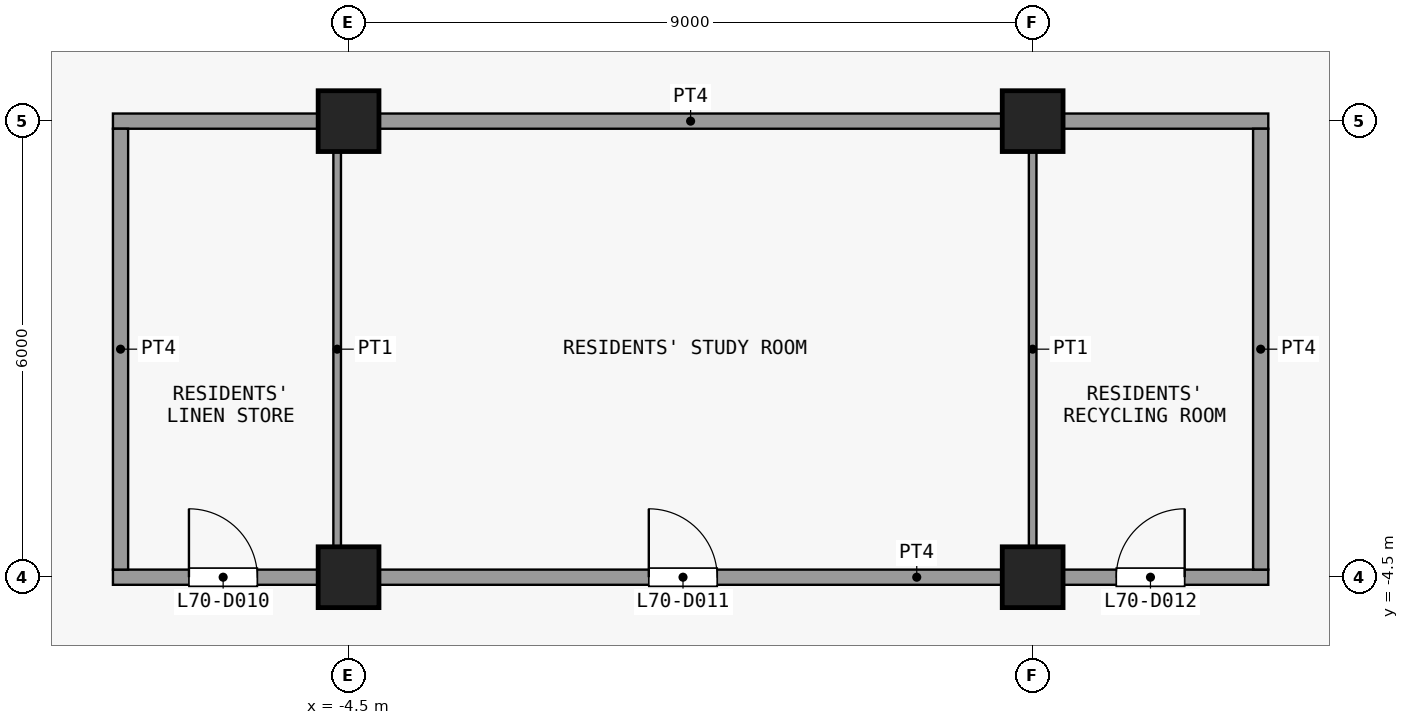
"""IFC4 building model, lengths in metres.
Left out: names, types, materials, properties, quantities, classifications, styles, units other than length and angle.
Written with IfcOpenShell. Run it as: python <this file> out.ifc"""

import sys

from ifc_helpers import new_model, si_unit, direction, frame, frame_2d, origin, origin_2d, place, context, subcontext, project, spatial, rectangle, extrude, element, fill, save


model = new_model("IFC4")
c1 = context("Model", 3, precision=1e-05, world=origin(), true_north=direction((0.0, 1.0)))
c2 = subcontext(c1, "Body", "Model", "MODEL_VIEW")
j1 = project(units=[si_unit("LENGTHUNIT", "METRE"), si_unit("PLANEANGLEUNIT", "RADIAN")], contexts=[c1])
p1 = place(None, origin())
s1 = spatial("IfcSite", under=j1, at=p1, CompositionType="ELEMENT")
p2 = place(p1, origin())
s2 = spatial("IfcBuilding", under=s1, at=p2, CompositionType="ELEMENT")
p3 = place(p2, frame((0.0, 0.0, 277.1)))
s3 = spatial("IfcBuildingStorey", under=s2, at=p3, CompositionType="ELEMENT", Elevation=277.1)
for number, where, z_axis, x_axis in (
    (1, (-4.5, -4.5, 0.0), (0.0, 0.0, 1.0), (1.0, 0.0, 0.0)),
    (2, (-4.5, 1.5, 0.0), (0.0, 0.0, 1.0), (1.0, 0.0, 0.0)),
    (3, (4.5, -4.5, 0.0), (0.0, 0.0, 1.0), (1.0, 0.0, 0.0)),
    (4, (4.5, 1.5, 0.0), (0.0, 0.0, 1.0), (1.0, 0.0, 0.0)),
):
    element("IfcColumn", number, at=place(p3, frame(where, z_axis=z_axis, x_axis=x_axis)), inside=s3, PredefinedType="COLUMN", context=c2, shape_type="SweptSolid", body=[
        extrude(rectangle(XDim=0.8, YDim=0.8, at=origin_2d()), origin(), (0.0, 0.0, 1.0), 3.6),
    ])
p4 = place(p3, frame((-7.6, -4.5, 0.0), z_axis=(0.0, 0.0, 1.0), x_axis=(1.0, 0.0, 0.0)))
e5 = element("IfcWall", 5, at=p4, inside=s3, PredefinedType="PARTITIONING", context=c2, shape_type="SweptSolid", body=[
    extrude(rectangle(XDim=15.2, YDim=0.2, at=frame_2d((7.6, 0.0))), origin(), (0.0, 0.0, 1.0), 3.3),
])
p5 = place(p4, frame((1.0, 0.0, 0.0)))
e6 = element("IfcOpeningElement", 6, at=p5, cuts=e5, PredefinedType="OPENING", context=c2, shape_type="SweptSolid", body=[
    extrude(rectangle(XDim=0.9, YDim=2.1, at=frame_2d((0.45, 1.05))), frame((0.0, 0.11, 0.0), z_axis=(0.0, -1.0, 0.0), x_axis=(1.0, 0.0, 0.0)), (0.0, 0.0, 1.0), 0.22),
])
p6 = place(p4, frame((7.05, 0.0, 0.0)))
e7 = element("IfcOpeningElement", 7, at=p6, cuts=e5, PredefinedType="OPENING", context=c2, shape_type="SweptSolid", body=[
    extrude(rectangle(XDim=0.9, YDim=2.1, at=frame_2d((0.45, 1.05))), frame((0.0, 0.11, 0.0), z_axis=(0.0, -1.0, 0.0), x_axis=(1.0, 0.0, 0.0)), (0.0, 0.0, 1.0), 0.22),
])
p7 = place(p4, frame((13.2, 0.0, 0.0)))
e8 = element("IfcOpeningElement", 8, at=p7, cuts=e5, PredefinedType="OPENING", context=c2, shape_type="SweptSolid", body=[
    extrude(rectangle(XDim=0.9, YDim=2.1, at=frame_2d((0.45, 1.05))), frame((0.0, 0.11, 0.0), z_axis=(0.0, -1.0, 0.0), x_axis=(1.0, 0.0, 0.0)), (0.0, 0.0, 1.0), 0.22),
])
p8 = place(p3, frame((-7.6, 1.5, 0.0), z_axis=(0.0, 0.0, 1.0), x_axis=(1.0, 0.0, 0.0)))
e9 = element("IfcWall", 9, at=p8, inside=s3, PredefinedType="PARTITIONING", context=c2, shape_type="SweptSolid", body=[
    extrude(rectangle(XDim=15.2, YDim=0.2, at=frame_2d((7.6, 0.0))), origin(), (0.0, 0.0, 1.0), 3.3),
])
p9 = place(p3, frame((-7.5, -4.4, 0.0), z_axis=(0.0, 0.0, 1.0), x_axis=(0.0, 1.0, 0.0)))
e10 = element("IfcWall", 10, at=p9, inside=s3, PredefinedType="PARTITIONING", context=c2, shape_type="SweptSolid", body=[
    extrude(rectangle(XDim=5.8, YDim=0.2, at=frame_2d((2.9, 0.0))), origin(), (0.0, 0.0, 1.0), 3.3),
])
for number, where, z_axis, x_axis in (
    (11, (-4.65, -4.4, 0.0), (0.0, 0.0, 1.0), (0.0, 1.0, 0.0)),
    (12, (4.5, -4.4, 0.0), (0.0, 0.0, 1.0), (0.0, 1.0, 0.0)),
):
    element("IfcWall", number, at=place(p3, frame(where, z_axis=z_axis, x_axis=x_axis)), inside=s3, PredefinedType="PARTITIONING", context=c2, shape_type="SweptSolid", body=[
        extrude(rectangle(XDim=5.8, YDim=0.1, at=frame_2d((2.9, 0.0))), origin(), (0.0, 0.0, 1.0), 3.3),
    ])
p10 = place(p3, frame((7.5, -4.4, 0.0), z_axis=(0.0, 0.0, 1.0), x_axis=(0.0, 1.0, 0.0)))
e13 = element("IfcWall", 13, at=p10, inside=s3, PredefinedType="PARTITIONING", context=c2, shape_type="SweptSolid", body=[
    extrude(rectangle(XDim=5.8, YDim=0.2, at=frame_2d((2.9, 0.0))), origin(), (0.0, 0.0, 1.0), 3.3),
])
p11 = place(p5, origin())
e14 = element("IfcDoor", 14, at=p11, inside=s3, OperationType="SINGLE_SWING_RIGHT", PredefinedType="DOOR", context=c2, shape_type="SweptSolid", body=[
    extrude(rectangle(XDim=0.9, YDim=2.1, at=frame_2d((0.45, 1.05))), frame((0.0, 0.025, 0.0), z_axis=(0.0, -1.0, 0.0), x_axis=(1.0, 0.0, 0.0)), (0.0, 0.0, 1.0), 0.05),
])
fill(e6, e14)
p12 = place(p6, origin())
e15 = element("IfcDoor", 15, at=p12, inside=s3, OperationType="SINGLE_SWING_RIGHT", PredefinedType="DOOR", context=c2, shape_type="SweptSolid", body=[
    extrude(rectangle(XDim=0.9, YDim=2.1, at=frame_2d((0.45, 1.05))), frame((0.0, 0.025, 0.0), z_axis=(0.0, -1.0, 0.0), x_axis=(1.0, 0.0, 0.0)), (0.0, 0.0, 1.0), 0.05),
])
fill(e7, e15)
p13 = place(p7, origin())
e16 = element("IfcDoor", 16, at=p13, inside=s3, OperationType="SINGLE_SWING_LEFT", PredefinedType="DOOR", context=c2, shape_type="SweptSolid", body=[
    extrude(rectangle(XDim=0.9, YDim=2.1, at=frame_2d((0.45, 1.05))), frame((0.0, 0.025, 0.0), z_axis=(0.0, -1.0, 0.0), x_axis=(1.0, 0.0, 0.0)), (0.0, 0.0, 1.0), 0.05),
])
fill(e8, e16)
save(model, sys.argv[1])
